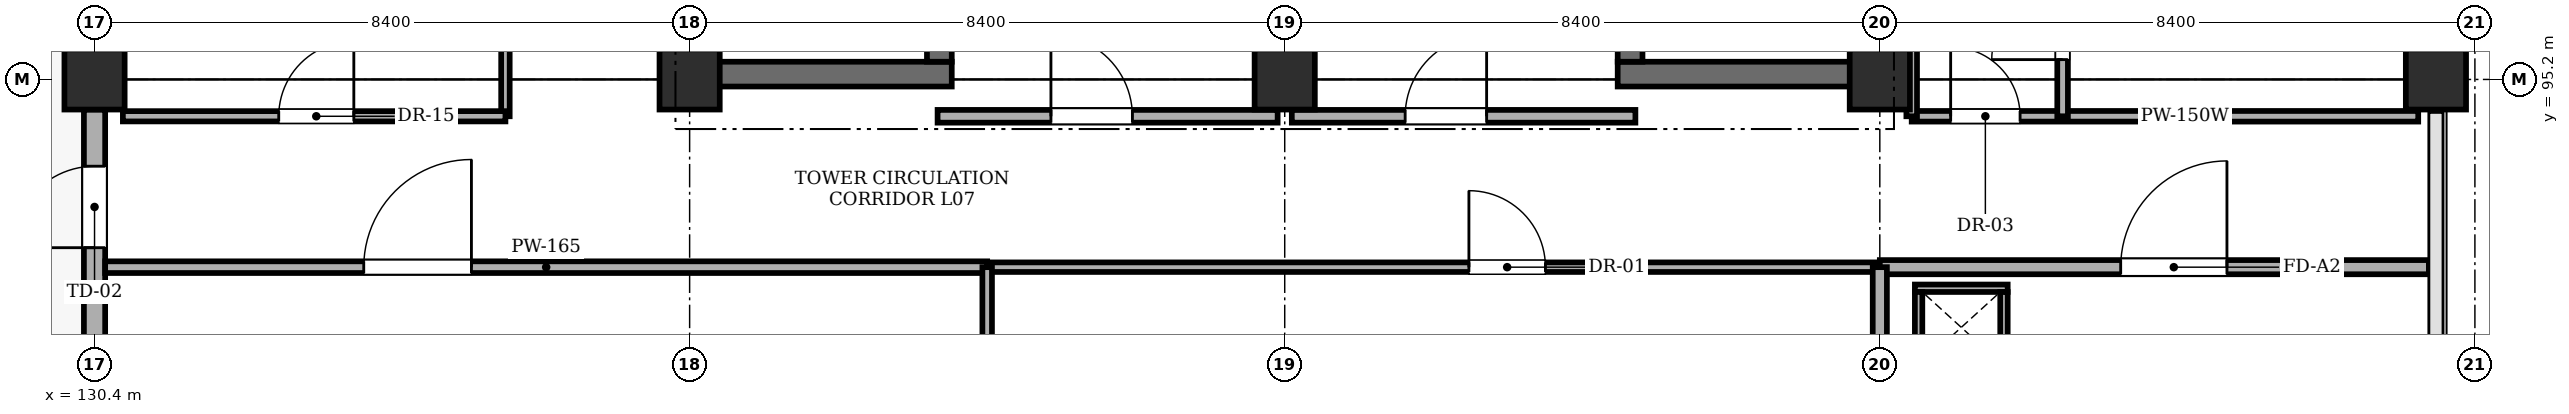
"""IFC4 building model, lengths in metres.
Left out: names, types, materials, properties, quantities, classifications, styles, units other than length and angle.
Written with IfcOpenShell. Run it as: python <this file> out.ifc"""

import sys

from ifc_helpers import new_model, si_unit, direction, frame, frame_2d, origin, origin_2d, place, context, subcontext, project, spatial, rectangle, extrude, element, fill, save


model = new_model("IFC4")
c1 = context("Model", 3, precision=1e-05, world=origin(), true_north=direction((0.0, 1.0)))
c2 = subcontext(c1, "Body", "Model", "MODEL_VIEW")
j1 = project(units=[si_unit("LENGTHUNIT", "METRE"), si_unit("PLANEANGLEUNIT", "RADIAN")], contexts=[c1])
p1 = place(None, origin())
s1 = spatial("IfcSite", under=j1, at=p1, CompositionType="ELEMENT")
p2 = place(p1, origin())
s2 = spatial("IfcBuilding", under=s1, at=p2, CompositionType="ELEMENT")
p3 = place(p2, frame((0.0, 0.0, 27.6)))
s3 = spatial("IfcBuildingStorey", under=s2, at=p3, CompositionType="ELEMENT", Elevation=27.6)
for number, where, z_axis, x_axis in (
    (1, (130.4, 95.2, 0.0), (0.0, 0.0, 1.0), (1.0, 0.0, 0.0)),
    (2, (138.8, 95.2, 0.0), (0.0, 0.0, 1.0), (1.0, 0.0, 0.0)),
    (3, (147.2, 95.2, 0.0), (0.0, 0.0, 1.0), (1.0, 0.0, 0.0)),
    (4, (155.6, 95.2, 0.0), (0.0, 0.0, 1.0), (1.0, 0.0, 0.0)),
    (5, (163.45, 95.2, 0.0), (0.0, 0.0, 1.0), (1.0, 0.0, 0.0)),
):
    element("IfcColumn", number, at=place(p3, frame(where, z_axis=z_axis, x_axis=x_axis)), inside=s3, PredefinedType="COLUMN", context=c2, shape_type="SweptSolid", body=[
        extrude(rectangle(XDim=0.85, YDim=0.85, at=origin_2d()), origin(), (0.0, 0.0, 1.0), 4.02),
    ])
p4 = place(p3, frame((138.7, 95.275, 0.0), z_axis=(0.0, 0.0, 1.0), x_axis=(1.0, 0.0, 0.0)))
e6 = element("IfcWall", 6, at=p4, inside=s3, PredefinedType="SHEAR", context=c2, shape_type="SweptSolid", body=[
    extrude(rectangle(XDim=3.8, YDim=0.35, at=frame_2d((1.9, 0.0))), origin(), (0.0, 0.0, 1.0), 4.02),
])
p5 = place(p3, frame((138.875, 95.45, 0.0), z_axis=(0.0, 0.0, 1.0), x_axis=(0.0, 1.0, 0.0)))
e7 = element("IfcWall", 7, at=p5, inside=s3, PredefinedType="SHEAR", context=c2, shape_type="SweptSolid", body=[
    extrude(rectangle(XDim=7.9, YDim=0.35, at=frame_2d((3.95, 0.0))), origin(), (0.0, 0.0, 1.0), 4.02),
])
p6 = place(p3, frame((142.325, 95.45, 0.0), z_axis=(0.0, 0.0, 1.0), x_axis=(0.0, 1.0, 0.0)))
e8 = element("IfcWall", 8, at=p6, inside=s3, PredefinedType="SHEAR", context=c2, shape_type="SweptSolid", body=[
    extrude(rectangle(XDim=7.9, YDim=0.35, at=frame_2d((3.95, 0.0))), origin(), (0.0, 0.0, 1.0), 4.02),
])
p7 = place(p6, frame((0.22, 0.0, 0.0)))
e9 = element("IfcOpeningElement", 9, at=p7, cuts=e8, PredefinedType="OPENING", context=c2, shape_type="SweptSolid", body=[
    extrude(rectangle(XDim=1.15, YDim=2.15, at=frame_2d((0.575, 1.075))), frame((0.0, 0.185, 0.0), z_axis=(0.0, -1.0, 0.0), x_axis=(1.0, 0.0, 0.0)), (0.0, 0.0, 1.0), 0.37),
])
p8 = place(p3, frame((151.9, 95.275, 0.0), z_axis=(0.0, 0.0, 1.0), x_axis=(1.0, 0.0, 0.0)))
e10 = element("IfcWall", 10, at=p8, inside=s3, PredefinedType="SHEAR", context=c2, shape_type="SweptSolid", body=[
    extrude(rectangle(XDim=3.8, YDim=0.35, at=frame_2d((1.9, 0.0))), origin(), (0.0, 0.0, 1.0), 4.02),
])
p9 = place(p3, frame((152.075, 95.45, 0.0), z_axis=(0.0, 0.0, 1.0), x_axis=(0.0, 1.0, 0.0)))
e11 = element("IfcWall", 11, at=p9, inside=s3, PredefinedType="SHEAR", context=c2, shape_type="SweptSolid", body=[
    extrude(rectangle(XDim=7.9, YDim=0.35, at=frame_2d((3.95, 0.0))), origin(), (0.0, 0.0, 1.0), 4.02),
])
p10 = place(p9, frame((0.35, 0.0, 0.0)))
e12 = element("IfcOpeningElement", 12, at=p10, cuts=e11, PredefinedType="OPENING", context=c2, shape_type="SweptSolid", body=[
    extrude(rectangle(XDim=1.15, YDim=2.15, at=frame_2d((0.575, 1.075))), frame((0.0, 0.185, 0.0), z_axis=(0.0, -1.0, 0.0), x_axis=(1.0, 0.0, 0.0)), (0.0, 0.0, 1.0), 0.37),
])
p11 = place(p3, frame((155.525, 95.45, 0.0), z_axis=(0.0, 0.0, 1.0), x_axis=(0.0, 1.0, 0.0)))
e13 = element("IfcWall", 13, at=p11, inside=s3, PredefinedType="SHEAR", context=c2, shape_type="SweptSolid", body=[
    extrude(rectangle(XDim=7.9, YDim=0.35, at=frame_2d((3.95, 0.0))), origin(), (0.0, 0.0, 1.0), 4.02),
])
p12 = place(p3, frame((130.4, 87.225, 0.0), z_axis=(0.0, 0.0, 1.0), x_axis=(0.0, 1.0, 0.0)))
e14 = element("IfcWall", 14, at=p12, inside=s3, PredefinedType="STANDARD", context=c2, shape_type="SweptSolid", body=[
    extrude(rectangle(XDim=7.55, YDim=0.3, at=frame_2d((3.775, 0.0))), origin(), (0.0, 0.0, 1.0), 3.32),
])
p13 = place(p12, frame((5.6, 0.0, 0.0)))
e15 = element("IfcOpeningElement", 15, at=p13, cuts=e14, PredefinedType="OPENING", context=c2, shape_type="SweptSolid", body=[
    extrude(rectangle(XDim=1.15, YDim=2.25, at=frame_2d((0.575, 1.125))), frame((0.0, 0.16, 0.0), z_axis=(0.0, -1.0, 0.0), x_axis=(1.0, 0.0, 0.0)), (0.0, 0.0, 1.0), 0.32),
])
p14 = place(p3, frame((142.3, 94.68, 0.0), z_axis=(0.0, 0.0, 1.0), x_axis=(1.0, 0.0, 0.0)))
e16 = element("IfcWall", 16, at=p14, inside=s3, PredefinedType="STANDARD", context=c2, shape_type="SweptSolid", body=[
    extrude(rectangle(XDim=4.8, YDim=0.18, at=frame_2d((2.4, 0.0))), origin(), (0.0, 0.0, 1.0), 4.02),
])
p15 = place(p14, frame((1.6, 0.0, 0.0)))
e17 = element("IfcOpeningElement", 17, at=p15, cuts=e16, PredefinedType="OPENING", context=c2, shape_type="SweptSolid", body=[
    extrude(rectangle(XDim=1.15, YDim=2.15, at=frame_2d((0.575, 1.075))), frame((0.0, 0.1, 0.0), z_axis=(0.0, -1.0, 0.0), x_axis=(1.0, 0.0, 0.0)), (0.0, 0.0, 1.0), 0.2),
])
p16 = place(p3, frame((147.3, 94.68, 0.0), z_axis=(0.0, 0.0, 1.0), x_axis=(1.0, 0.0, 0.0)))
e18 = element("IfcWall", 18, at=p16, inside=s3, PredefinedType="STANDARD", context=c2, shape_type="SweptSolid", body=[
    extrude(rectangle(XDim=4.85, YDim=0.18, at=frame_2d((2.425, 0.0))), origin(), (0.0, 0.0, 1.0), 4.02),
])
p17 = place(p16, frame((1.6, 0.0, 0.0)))
e19 = element("IfcOpeningElement", 19, at=p17, cuts=e18, PredefinedType="OPENING", context=c2, shape_type="SweptSolid", body=[
    extrude(rectangle(XDim=1.15, YDim=2.15, at=frame_2d((0.575, 1.075))), frame((0.0, 0.1, 0.0), z_axis=(0.0, -1.0, 0.0), x_axis=(1.0, 0.0, 0.0)), (0.0, 0.0, 1.0), 0.2),
])
p18 = place(p3, frame((156.05, 94.68, 0.0), z_axis=(0.0, 0.0, 1.0), x_axis=(1.0, 0.0, 0.0)))
e20 = element("IfcWall", 20, at=p18, inside=s3, PredefinedType="PARTITIONING", context=c2, shape_type="SweptSolid", body=[
    extrude(rectangle(XDim=7.15, YDim=0.15, at=frame_2d((3.575, 0.0))), origin(), (0.0, 0.0, 1.0), 4.02),
])
p19 = place(p18, frame((0.55, 0.0, 0.0)))
e21 = element("IfcOpeningElement", 21, at=p19, cuts=e20, PredefinedType="OPENING", context=c2, shape_type="SweptSolid", body=[
    extrude(rectangle(XDim=0.98, YDim=2.12, at=frame_2d((0.49, 1.06))), frame((0.0, 0.085, 0.0), z_axis=(0.0, -1.0, 0.0), x_axis=(1.0, 0.0, 0.0)), (0.0, 0.0, 1.0), 0.17),
])
p20 = place(p3, frame((158.18, 94.68, 0.0), z_axis=(0.0, 0.0, 1.0), x_axis=(0.0, 1.0, 0.0)))
e22 = element("IfcWall", 22, at=p20, inside=s3, PredefinedType="PARTITIONING", context=c2, shape_type="SweptSolid", body=[
    extrude(rectangle(XDim=8.57, YDim=0.15, at=frame_2d((4.285, 0.0))), origin(), (0.0, 0.0, 1.0), 4.02),
])
p21 = place(p20, frame((0.8, 0.0, 0.0)))
e23 = element("IfcOpeningElement", 23, at=p21, cuts=e22, PredefinedType="OPENING", context=c2, shape_type="SweptSolid", body=[
    extrude(rectangle(XDim=1.0, YDim=2.12, at=frame_2d((0.5, 1.06))), frame((0.0, 0.085, 0.0), z_axis=(0.0, -1.0, 0.0), x_axis=(1.0, 0.0, 0.0)), (0.0, 0.0, 1.0), 0.17),
])
p22 = place(p20, frame((3.5, 0.0, 0.0)))
e24 = element("IfcOpeningElement", 24, at=p22, cuts=e22, PredefinedType="OPENING", context=c2, shape_type="SweptSolid", body=[
    extrude(rectangle(XDim=0.92, YDim=2.1, at=frame_2d((0.46, 1.05))), frame((0.0, 0.085, 0.0), z_axis=(0.0, -1.0, 0.0), x_axis=(1.0, 0.0, 0.0)), (0.0, 0.0, 1.0), 0.17),
])
p23 = place(p20, frame((6.4, 0.0, 0.0)))
e25 = element("IfcOpeningElement", 25, at=p23, cuts=e22, PredefinedType="OPENING", context=c2, shape_type="SweptSolid", body=[
    extrude(rectangle(XDim=0.92, YDim=2.1, at=frame_2d((0.46, 1.05))), frame((0.0, 0.085, 0.0), z_axis=(0.0, -1.0, 0.0), x_axis=(1.0, 0.0, 0.0)), (0.0, 0.0, 1.0), 0.17),
])
p24 = place(p3, frame((156.05, 94.68, 0.0), z_axis=(0.0, 0.0, 1.0), x_axis=(0.0, 1.0, 0.0)))
e26 = element("IfcWall", 26, at=p24, inside=s3, PredefinedType="PARTITIONING", context=c2, shape_type="SweptSolid", body=[
    extrude(rectangle(XDim=8.57, YDim=0.15, at=frame_2d((4.285, 0.0))), origin(), (0.0, 0.0, 1.0), 4.02),
])
p25 = place(p3, frame((136.2, 94.68, 0.0), z_axis=(0.0, 0.0, 1.0), x_axis=(0.0, 1.0, 0.0)))
e27 = element("IfcWall", 27, at=p25, inside=s3, PredefinedType="PARTITIONING", context=c2, shape_type="SweptSolid", body=[
    extrude(rectangle(XDim=9.07, YDim=0.12, at=frame_2d((4.535, 0.0))), origin(), (0.0, 0.0, 1.0), 4.02),
])
p26 = place(p3, frame((130.8, 94.68, 0.0), z_axis=(0.0, 0.0, 1.0), x_axis=(1.0, 0.0, 0.0)))
e28 = element("IfcWall", 28, at=p26, inside=s3, PredefinedType="PARTITIONING", context=c2, shape_type="SweptSolid", body=[
    extrude(rectangle(XDim=5.4, YDim=0.145, at=frame_2d((2.7, 0.0))), origin(), (0.0, 0.0, 1.0), 4.02),
])
p27 = place(p26, frame((2.2, 0.0, 0.0)))
e29 = element("IfcOpeningElement", 29, at=p27, cuts=e28, PredefinedType="OPENING", context=c2, shape_type="SweptSolid", body=[
    extrude(rectangle(XDim=1.06, YDim=2.16, at=frame_2d((0.53, 1.08))), frame((0.0, 0.083, 0.0), z_axis=(0.0, -1.0, 0.0), x_axis=(1.0, 0.0, 0.0)), (0.0, 0.0, 1.0), 0.165),
])
p28 = place(p3, frame((130.55, 92.55, 0.0), z_axis=(0.0, 0.0, 1.0), x_axis=(1.0, 0.0, 0.0)))
e30 = element("IfcWall", 30, at=p28, inside=s3, PredefinedType="PARTITIONING", context=c2, shape_type="SweptSolid", body=[
    extrude(rectangle(XDim=12.45, YDim=0.165, at=frame_2d((6.225, 0.0))), origin(), (0.0, 0.0, 1.0), 4.02),
])
p29 = place(p28, frame((3.65, 0.0, 0.0)))
e31 = element("IfcOpeningElement", 31, at=p29, cuts=e30, PredefinedType="OPENING", context=c2, shape_type="SweptSolid", body=[
    extrude(rectangle(XDim=1.52, YDim=2.22, at=frame_2d((0.76, 1.11))), frame((0.0, 0.093, 0.0), z_axis=(0.0, -1.0, 0.0), x_axis=(1.0, 0.0, 0.0)), (0.0, 0.0, 1.0), 0.185),
])
p30 = place(p3, frame((143.0, 92.55, 0.0), z_axis=(0.0, 0.0, 1.0), x_axis=(1.0, 0.0, 0.0)))
e32 = element("IfcWall", 32, at=p30, inside=s3, PredefinedType="PARTITIONING", context=c2, shape_type="SweptSolid", body=[
    extrude(rectangle(XDim=12.6, YDim=0.135, at=frame_2d((6.3, 0.0))), origin(), (0.0, 0.0, 1.0), 4.02),
])
p31 = place(p30, frame((6.8, 0.0, 0.0)))
e33 = element("IfcOpeningElement", 33, at=p31, cuts=e32, PredefinedType="OPENING", context=c2, shape_type="SweptSolid", body=[
    extrude(rectangle(XDim=1.08, YDim=2.15, at=frame_2d((0.54, 1.075))), frame((0.0, 0.077, 0.0), z_axis=(0.0, -1.0, 0.0), x_axis=(1.0, 0.0, 0.0)), (0.0, 0.0, 1.0), 0.155),
])
p32 = place(p3, frame((143.0, 78.55, 0.0), z_axis=(0.0, 0.0, 1.0), x_axis=(0.0, 1.0, 0.0)))
e34 = element("IfcWall", 34, at=p32, inside=s3, PredefinedType="PARTITIONING", context=c2, shape_type="SweptSolid", body=[
    extrude(rectangle(XDim=14.0, YDim=0.135, at=frame_2d((7.0, 0.0))), origin(), (0.0, 0.0, 1.0), 3.52),
])
p33 = place(p3, frame((155.6, 92.55, 0.0), z_axis=(0.0, 0.0, 1.0), x_axis=(1.0, 0.0, 0.0)))
e35 = element("IfcWall", 35, at=p33, inside=s3, PredefinedType="SOLIDWALL", context=c2, shape_type="SweptSolid", body=[
    extrude(rectangle(XDim=7.75, YDim=0.2, at=frame_2d((3.875, 0.0))), origin(), (0.0, 0.0, 1.0), 4.02),
])
p34 = place(p33, frame((3.4, 0.0, 0.0)))
e36 = element("IfcOpeningElement", 36, at=p34, cuts=e35, PredefinedType="OPENING", context=c2, shape_type="SweptSolid", body=[
    extrude(rectangle(XDim=1.5, YDim=2.2, at=frame_2d((0.75, 1.1))), frame((0.0, 0.11, 0.0), z_axis=(0.0, -1.0, 0.0), x_axis=(1.0, 0.0, 0.0)), (0.0, 0.0, 1.0), 0.22),
])
p35 = place(p3, frame((155.6, 78.55, 0.0), z_axis=(0.0, 0.0, 1.0), x_axis=(0.0, 1.0, 0.0)))
e37 = element("IfcWall", 37, at=p35, inside=s3, PredefinedType="SOLIDWALL", context=c2, shape_type="SweptSolid", body=[
    extrude(rectangle(XDim=14.0, YDim=0.2, at=frame_2d((7.0, 0.0))), origin(), (0.0, 0.0, 1.0), 3.32),
])
p36 = place(p3, frame((156.095, 92.252, 0.0), z_axis=(0.0, 0.0, 1.0), x_axis=(1.0, 0.0, 0.0)))
e38 = element("IfcWall", 38, at=p36, inside=s3, PredefinedType="PARTITIONING", context=c2, shape_type="SweptSolid", body=[
    extrude(rectangle(XDim=1.31, YDim=0.105, at=frame_2d((0.655, 0.0))), origin(), (0.0, 0.0, 1.0), 4.02),
])
for number, where, z_axis, x_axis in (
    (39, (156.147, 91.2, 0.0), (0.0, 0.0, 1.0), (0.0, 1.0, 0.0)),
    (40, (157.353, 91.2, 0.0), (0.0, 0.0, 1.0), (0.0, 1.0, 0.0)),
):
    element("IfcWall", number, at=place(p3, frame(where, z_axis=z_axis, x_axis=x_axis)), inside=s3, PredefinedType="PARTITIONING", context=c2, shape_type="SweptSolid", body=[
        extrude(rectangle(XDim=1.0, YDim=0.105, at=frame_2d((0.5, 0.0))), origin(), (0.0, 0.0, 1.0), 4.02),
    ])
p37 = place(p13, origin())
e41 = element("IfcDoor", 41, at=p37, inside=s3, OperationType="SINGLE_SWING_LEFT", PredefinedType="DOOR", context=c2, shape_type="SweptSolid", body=[
    extrude(rectangle(XDim=1.15, YDim=2.25, at=frame_2d((0.575, 1.125))), frame((0.0, 0.025, 0.0), z_axis=(0.0, -1.0, 0.0), x_axis=(1.0, 0.0, 0.0)), (0.0, 0.0, 1.0), 0.05),
])
fill(e15, e41)
p38 = place(p15, origin())
e42 = element("IfcDoor", 42, at=p38, inside=s3, OperationType="SINGLE_SWING_LEFT", PredefinedType="DOOR", context=c2, shape_type="SweptSolid", body=[
    extrude(rectangle(XDim=1.15, YDim=2.15, at=frame_2d((0.575, 1.075))), frame((0.0, 0.025, 0.0), z_axis=(0.0, -1.0, 0.0), x_axis=(1.0, 0.0, 0.0)), (0.0, 0.0, 1.0), 0.05),
])
fill(e17, e42)
p39 = place(p17, origin())
e43 = element("IfcDoor", 43, at=p39, inside=s3, OperationType="SINGLE_SWING_RIGHT", PredefinedType="DOOR", context=c2, shape_type="SweptSolid", body=[
    extrude(rectangle(XDim=1.15, YDim=2.15, at=frame_2d((0.575, 1.075))), frame((0.0, 0.025, 0.0), z_axis=(0.0, -1.0, 0.0), x_axis=(1.0, 0.0, 0.0)), (0.0, 0.0, 1.0), 0.05),
])
fill(e19, e43)
p40 = place(p19, origin())
e44 = element("IfcDoor", 44, at=p40, inside=s3, OperationType="SINGLE_SWING_LEFT", PredefinedType="DOOR", context=c2, shape_type="SweptSolid", body=[
    extrude(rectangle(XDim=0.98, YDim=2.12, at=frame_2d((0.49, 1.06))), frame((0.0, 0.025, 0.0), z_axis=(0.0, -1.0, 0.0), x_axis=(1.0, 0.0, 0.0)), (0.0, 0.0, 1.0), 0.05),
])
fill(e21, e44)
p41 = place(p21, origin())
e45 = element("IfcDoor", 45, at=p41, inside=s3, OperationType="SINGLE_SWING_LEFT", PredefinedType="DOOR", context=c2, shape_type="SweptSolid", body=[
    extrude(rectangle(XDim=1.0, YDim=2.12, at=frame_2d((0.5, 1.06))), frame((0.0, 0.025, 0.0), z_axis=(0.0, -1.0, 0.0), x_axis=(1.0, 0.0, 0.0)), (0.0, 0.0, 1.0), 0.05),
])
fill(e23, e45)
p42 = place(p27, origin())
e46 = element("IfcDoor", 46, at=p42, inside=s3, OperationType="SINGLE_SWING_RIGHT", PredefinedType="DOOR", context=c2, shape_type="SweptSolid", body=[
    extrude(rectangle(XDim=1.06, YDim=2.16, at=frame_2d((0.53, 1.08))), frame((0.0, 0.025, 0.0), z_axis=(0.0, -1.0, 0.0), x_axis=(1.0, 0.0, 0.0)), (0.0, 0.0, 1.0), 0.05),
])
fill(e29, e46)
p43 = place(p29, origin())
e47 = element("IfcDoor", 47, at=p43, inside=s3, OperationType="SINGLE_SWING_RIGHT", PredefinedType="DOOR", context=c2, shape_type="SweptSolid", body=[
    extrude(rectangle(XDim=1.52, YDim=2.22, at=frame_2d((0.76, 1.11))), frame((0.0, 0.025, 0.0), z_axis=(0.0, -1.0, 0.0), x_axis=(1.0, 0.0, 0.0)), (0.0, 0.0, 1.0), 0.05),
])
fill(e31, e47)
p44 = place(p31, origin())
e48 = element("IfcDoor", 48, at=p44, inside=s3, OperationType="SINGLE_SWING_LEFT", PredefinedType="DOOR", context=c2, shape_type="SweptSolid", body=[
    extrude(rectangle(XDim=1.08, YDim=2.15, at=frame_2d((0.54, 1.075))), frame((0.0, 0.025, 0.0), z_axis=(0.0, -1.0, 0.0), x_axis=(1.0, 0.0, 0.0)), (0.0, 0.0, 1.0), 0.05),
])
fill(e33, e48)
p45 = place(p34, origin())
e49 = element("IfcDoor", 49, at=p45, inside=s3, OperationType="SINGLE_SWING_RIGHT", PredefinedType="DOOR", context=c2, shape_type="SweptSolid", body=[
    extrude(rectangle(XDim=1.5, YDim=2.2, at=frame_2d((0.75, 1.1))), frame((0.0, 0.025, 0.0), z_axis=(0.0, -1.0, 0.0), x_axis=(1.0, 0.0, 0.0)), (0.0, 0.0, 1.0), 0.05),
])
fill(e36, e49)
save(model, sys.argv[1])
